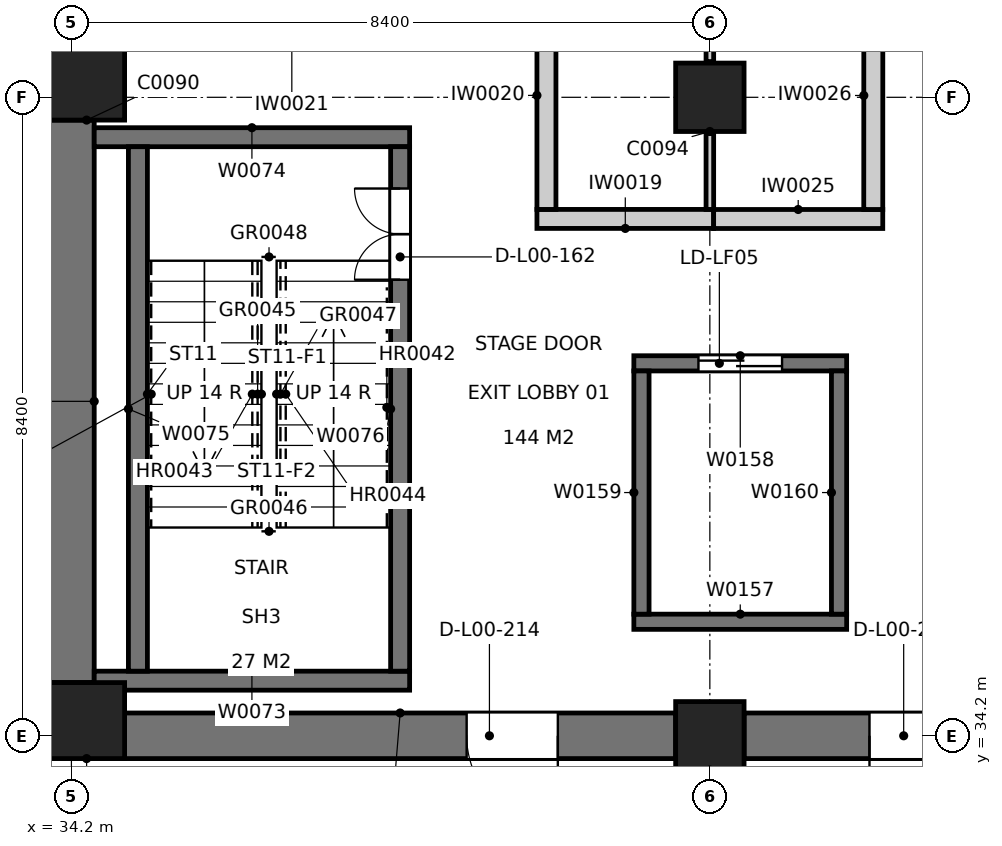
"""IFC4 building model, lengths in metres.
Left out: names, types, materials, properties, quantities, classifications, styles, units other than length and angle.
Written with IfcOpenShell. Run it as: python <this file> out.ifc"""

import sys

from ifc_helpers import new_model, si_unit, direction, frame, frame_2d, origin, origin_2d, place, context, subcontext, project, spatial, rectangle, extrude, element, fill, save


model = new_model("IFC4")
c1 = context("Model", 3, precision=1e-05, world=origin(), true_north=direction((0.0, 1.0)))
c2 = subcontext(c1, "Body", "Model", "MODEL_VIEW")
j1 = project(units=[si_unit("LENGTHUNIT", "METRE"), si_unit("PLANEANGLEUNIT", "RADIAN")], contexts=[c1])
p1 = place(None, origin())
s1 = spatial("IfcSite", under=j1, at=p1, CompositionType="ELEMENT")
p2 = place(p1, origin())
s2 = spatial("IfcBuilding", under=s1, at=p2, CompositionType="ELEMENT")
p3 = place(p2, origin())
s3 = spatial("IfcBuildingStorey", under=s2, at=p3, CompositionType="ELEMENT", Elevation=0.0)
for number, where, z_axis, x_axis in (
    (1, (34.4, 34.4, 0.0), (0.0, 0.0, 1.0), (1.0, 0.0, 0.0)),
    (2, (34.4, 42.8, 0.0), (0.0, 0.0, 1.0), (1.0, 0.0, 0.0)),
):
    element("IfcColumn", number, at=place(p3, frame(where, z_axis=z_axis, x_axis=x_axis)), inside=s3, PredefinedType="COLUMN", context=c2, shape_type="SweptSolid", body=[
        extrude(rectangle(XDim=1.0, YDim=1.0, at=origin_2d()), origin(), (0.0, 0.0, 1.0), 4.8),
    ])
for number, where, z_axis, x_axis in (
    (3, (42.6, 34.2, 0.0), (0.0, 0.0, 1.0), (1.0, 0.0, 0.0)),
    (4, (42.6, 42.6, 0.0), (0.0, 0.0, 1.0), (1.0, 0.0, 0.0)),
):
    element("IfcColumn", number, at=place(p3, frame(where, z_axis=z_axis, x_axis=x_axis)), inside=s3, PredefinedType="COLUMN", context=c2, shape_type="SweptSolid", body=[
        extrude(rectangle(XDim=0.9, YDim=0.9, at=origin_2d()), origin(), (0.0, 0.0, 1.0), 4.8),
    ])
p4 = place(p3, frame((34.2, 42.3, 0.0), z_axis=(0.0, 0.0, 1.0), x_axis=(0.0, -1.0, 0.0)))
e5 = element("IfcWall", 5, at=p4, inside=s3, PredefinedType="SOLIDWALL", context=c2, shape_type="SweptSolid", body=[
    extrude(rectangle(XDim=7.4, YDim=0.6, at=frame_2d((3.7, 0.0))), origin(), (0.0, 0.0, 1.0), 4.8),
])
p5 = place(p3, frame((34.9, 34.2, 0.0), z_axis=(0.0, 0.0, 1.0), x_axis=(1.0, 0.0, 0.0)))
e6 = element("IfcWall", 6, at=p5, inside=s3, PredefinedType="SOLIDWALL", context=c2, shape_type="SweptSolid", body=[
    extrude(rectangle(XDim=7.25, YDim=0.6, at=frame_2d((3.625, 0.0))), origin(), (0.0, 0.0, 1.0), 4.8),
])
p6 = place(p5, frame((5.7, 0.0, 0.0), z_axis=(0.0, 0.0, 1.0), x_axis=(-1.0, 0.0, 0.0)))
e7 = element("IfcOpeningElement", 7, at=p6, cuts=e6, PredefinedType="OPENING", context=c2, shape_type="SweptSolid", body=[
    extrude(rectangle(XDim=1.2, YDim=2.1, at=frame_2d((0.6, 1.05))), frame((0.0, 0.31, 0.0), z_axis=(0.0, -1.0, 0.0), x_axis=(1.0, 0.0, 0.0)), (0.0, 0.0, 1.0), 0.62),
])
p7 = place(p3, frame((43.05, 34.2, 0.0), z_axis=(0.0, 0.0, 1.0), x_axis=(1.0, 0.0, 0.0)))
e8 = element("IfcWall", 8, at=p7, inside=s3, PredefinedType="SOLIDWALL", context=c2, shape_type="SweptSolid", body=[
    extrude(rectangle(XDim=7.25, YDim=0.6, at=frame_2d((3.625, 0.0))), origin(), (0.0, 0.0, 1.0), 4.8),
])
p8 = place(p7, frame((3.45, 0.0, 0.0), z_axis=(0.0, 0.0, 1.0), x_axis=(-1.0, 0.0, 0.0)))
e9 = element("IfcOpeningElement", 9, at=p8, cuts=e8, PredefinedType="OPENING", context=c2, shape_type="SweptSolid", body=[
    extrude(rectangle(XDim=1.8, YDim=2.1, at=frame_2d((0.9, 1.05))), frame((0.0, 0.31, 0.0), z_axis=(0.0, -1.0, 0.0), x_axis=(1.0, 0.0, 0.0)), (0.0, 0.0, 1.0), 0.62),
])
for number, where, z_axis, x_axis in (
    (10, (34.5, 34.925, 0.0), (0.0, 0.0, 1.0), (1.0, 0.0, 0.0)),
    (11, (34.5, 42.075, 0.0), (0.0, 0.0, 1.0), (1.0, 0.0, 0.0)),
):
    element("IfcWall", number, at=place(p3, frame(where, z_axis=z_axis, x_axis=x_axis)), inside=s3, PredefinedType="SOLIDWALL", context=c2, shape_type="SweptSolid", body=[
        extrude(rectangle(XDim=4.15, YDim=0.25, at=frame_2d((2.075, 0.0))), origin(), (0.0, 0.0, 1.0), 4.8),
    ])
p9 = place(p3, frame((35.075, 35.05, 0.0), z_axis=(0.0, 0.0, 1.0), x_axis=(0.0, 1.0, 0.0)))
e12 = element("IfcWall", 12, at=p9, inside=s3, PredefinedType="SOLIDWALL", context=c2, shape_type="SweptSolid", body=[
    extrude(rectangle(XDim=6.9, YDim=0.25, at=frame_2d((3.45, 0.0))), origin(), (0.0, 0.0, 1.0), 4.8),
])
p10 = place(p3, frame((38.525, 35.05, 0.0), z_axis=(0.0, 0.0, 1.0), x_axis=(0.0, 1.0, 0.0)))
e13 = element("IfcWall", 13, at=p10, inside=s3, PredefinedType="SOLIDWALL", context=c2, shape_type="SweptSolid", body=[
    extrude(rectangle(XDim=6.9, YDim=0.25, at=frame_2d((3.45, 0.0))), origin(), (0.0, 0.0, 1.0), 4.8),
])
p11 = place(p10, frame((5.15, 0.0, 0.0)))
e14 = element("IfcOpeningElement", 14, at=p11, cuts=e13, PredefinedType="OPENING", context=c2, shape_type="SweptSolid", body=[
    extrude(rectangle(XDim=1.2, YDim=2.1, at=frame_2d((0.6, 1.05))), frame((0.0, 0.135, 0.0), z_axis=(0.0, -1.0, 0.0), x_axis=(1.0, 0.0, 0.0)), (0.0, 0.0, 1.0), 0.27),
])
p12 = place(p3, frame((41.6, 35.7, 0.0), z_axis=(0.0, 0.0, 1.0), x_axis=(1.0, 0.0, 0.0)))
e15 = element("IfcWall", 15, at=p12, inside=s3, PredefinedType="SOLIDWALL", context=c2, shape_type="SweptSolid", body=[
    extrude(rectangle(XDim=2.8, YDim=0.2, at=frame_2d((1.4, 0.0))), origin(), (0.0, 0.0, 1.0), 4.8),
])
p13 = place(p3, frame((41.6, 39.1, 0.0), z_axis=(0.0, 0.0, 1.0), x_axis=(1.0, 0.0, 0.0)))
e16 = element("IfcWall", 16, at=p13, inside=s3, PredefinedType="SOLIDWALL", context=c2, shape_type="SweptSolid", body=[
    extrude(rectangle(XDim=2.8, YDim=0.2, at=frame_2d((1.4, 0.0))), origin(), (0.0, 0.0, 1.0), 4.8),
])
p14 = place(p13, frame((0.85, 0.0, 0.0)))
e17 = element("IfcOpeningElement", 17, at=p14, cuts=e16, PredefinedType="OPENING", context=c2, shape_type="SweptSolid", body=[
    extrude(rectangle(XDim=1.1, YDim=2.1, at=frame_2d((0.55, 1.05))), frame((0.0, 0.11, 0.0), z_axis=(0.0, -1.0, 0.0), x_axis=(1.0, 0.0, 0.0)), (0.0, 0.0, 1.0), 0.22),
])
for number, where, z_axis, x_axis in (
    (18, (41.7, 35.8, 0.0), (0.0, 0.0, 1.0), (0.0, 1.0, 0.0)),
    (19, (44.3, 35.8, 0.0), (0.0, 0.0, 1.0), (0.0, 1.0, 0.0)),
):
    element("IfcWall", number, at=place(p3, frame(where, z_axis=z_axis, x_axis=x_axis)), inside=s3, PredefinedType="SOLIDWALL", context=c2, shape_type="SweptSolid", body=[
        extrude(rectangle(XDim=3.2, YDim=0.2, at=frame_2d((1.6, 0.0))), origin(), (0.0, 0.0, 1.0), 4.8),
    ])
p15 = place(p3, frame((42.65, 41.0, 0.0), z_axis=(0.0, 0.0, 1.0), x_axis=(-1.0, 0.0, 0.0)))
e20 = element("IfcWall", 20, at=p15, inside=s3, PredefinedType="PARTITIONING", context=c2, shape_type="SweptSolid", body=[
    extrude(rectangle(XDim=2.325, YDim=0.25, at=frame_2d((1.163, 0.0))), origin(), (0.0, 0.0, 1.0), 3.62),
])
p16 = place(p3, frame((40.45, 41.125, 0.0), z_axis=(0.0, 0.0, 1.0), x_axis=(0.0, 1.0, 0.0)))
e21 = element("IfcWall", 21, at=p16, inside=s3, PredefinedType="PARTITIONING", context=c2, shape_type="SweptSolid", body=[
    extrude(rectangle(XDim=3.0, YDim=0.25, at=frame_2d((1.5, 0.0))), origin(), (0.0, 0.0, 1.0), 3.62),
])
p17 = place(p3, frame((42.6, 59.15, 0.0), z_axis=(0.0, 0.0, 1.0), x_axis=(0.0, -1.0, 0.0)))
e22 = element("IfcWall", 22, at=p17, inside=s3, PredefinedType="PARTITIONING", context=c2, shape_type="SweptSolid", body=[
    extrude(rectangle(XDim=16.08, YDim=0.1, at=frame_2d((8.04, 0.0))), origin(), (0.0, 0.0, 1.0), 3.62),
])
p18 = place(p3, frame((42.6, 42.13, 0.0), z_axis=(0.0, 0.0, 1.0), x_axis=(0.0, -1.0, 0.0)))
e23 = element("IfcWall", 23, at=p18, inside=s3, PredefinedType="PARTITIONING", context=c2, shape_type="SweptSolid", body=[
    extrude(rectangle(XDim=1.005, YDim=0.1, at=frame_2d((0.502, 0.0))), origin(), (0.0, 0.0, 1.0), 3.62),
])
p19 = place(p3, frame((42.65, 40.999, 0.0), z_axis=(0.0, 0.0, 1.0), x_axis=(1.0, 0.0, 0.0)))
e24 = element("IfcWall", 24, at=p19, inside=s3, PredefinedType="PARTITIONING", context=c2, shape_type="SweptSolid", body=[
    extrude(rectangle(XDim=2.225, YDim=0.25, at=frame_2d((1.113, 0.0))), origin(), (0.0, 0.0, 1.0), 3.62),
])
p20 = place(p3, frame((44.75, 41.124, 0.0), z_axis=(0.0, 0.0, 1.0), x_axis=(0.000325520816, 0.999999947018, 0.0)))
e25 = element("IfcWall", 25, at=p20, inside=s3, PredefinedType="PARTITIONING", context=c2, shape_type="SweptSolid", body=[
    extrude(rectangle(XDim=3.0, YDim=0.25, at=frame_2d((1.5, 0.0))), origin(), (0.0, 0.0, 1.0), 3.62),
])
p21 = place(p11, origin())
e26 = element("IfcDoor", 26, at=p21, inside=s3, OperationType="DOUBLE_DOOR_SINGLE_SWING", PredefinedType="DOOR", context=c2, shape_type="SweptSolid", body=[
    extrude(rectangle(XDim=1.2, YDim=2.1, at=frame_2d((0.6, 1.05))), frame((0.0, 0.025, 0.0), z_axis=(0.0, -1.0, 0.0), x_axis=(1.0, 0.0, 0.0)), (0.0, 0.0, 1.0), 0.05),
])
fill(e14, e26)
p22 = place(p6, origin())
e27 = element("IfcDoor", 27, at=p22, inside=s3, OperationType="SINGLE_SWING_LEFT", PredefinedType="DOOR", context=c2, shape_type="SweptSolid", body=[
    extrude(rectangle(XDim=1.2, YDim=2.1, at=frame_2d((0.6, 1.05))), frame((0.0, 0.025, 0.0), z_axis=(0.0, -1.0, 0.0), x_axis=(1.0, 0.0, 0.0)), (0.0, 0.0, 1.0), 0.05),
])
fill(e7, e27)
p23 = place(p8, origin())
e28 = element("IfcDoor", 28, at=p23, inside=s3, OperationType="DOUBLE_DOOR_SINGLE_SWING", PredefinedType="DOOR", context=c2, shape_type="SweptSolid", body=[
    extrude(rectangle(XDim=1.8, YDim=2.1, at=frame_2d((0.9, 1.05))), frame((0.0, 0.025, 0.0), z_axis=(0.0, -1.0, 0.0), x_axis=(1.0, 0.0, 0.0)), (0.0, 0.0, 1.0), 0.05),
])
fill(e9, e28)
p24 = place(p14, origin())
e29 = element("IfcDoor", 29, at=p24, inside=s3, OperationType="SLIDING_TO_LEFT", PredefinedType="DOOR", context=c2, shape_type="SweptSolid", body=[
    extrude(rectangle(XDim=1.1, YDim=2.1, at=frame_2d((0.55, 1.05))), frame((0.0, 0.025, 0.0), z_axis=(0.0, -1.0, 0.0), x_axis=(1.0, 0.0, 0.0)), (0.0, 0.0, 1.0), 0.05),
])
fill(e17, e29)
save(model, sys.argv[1])
